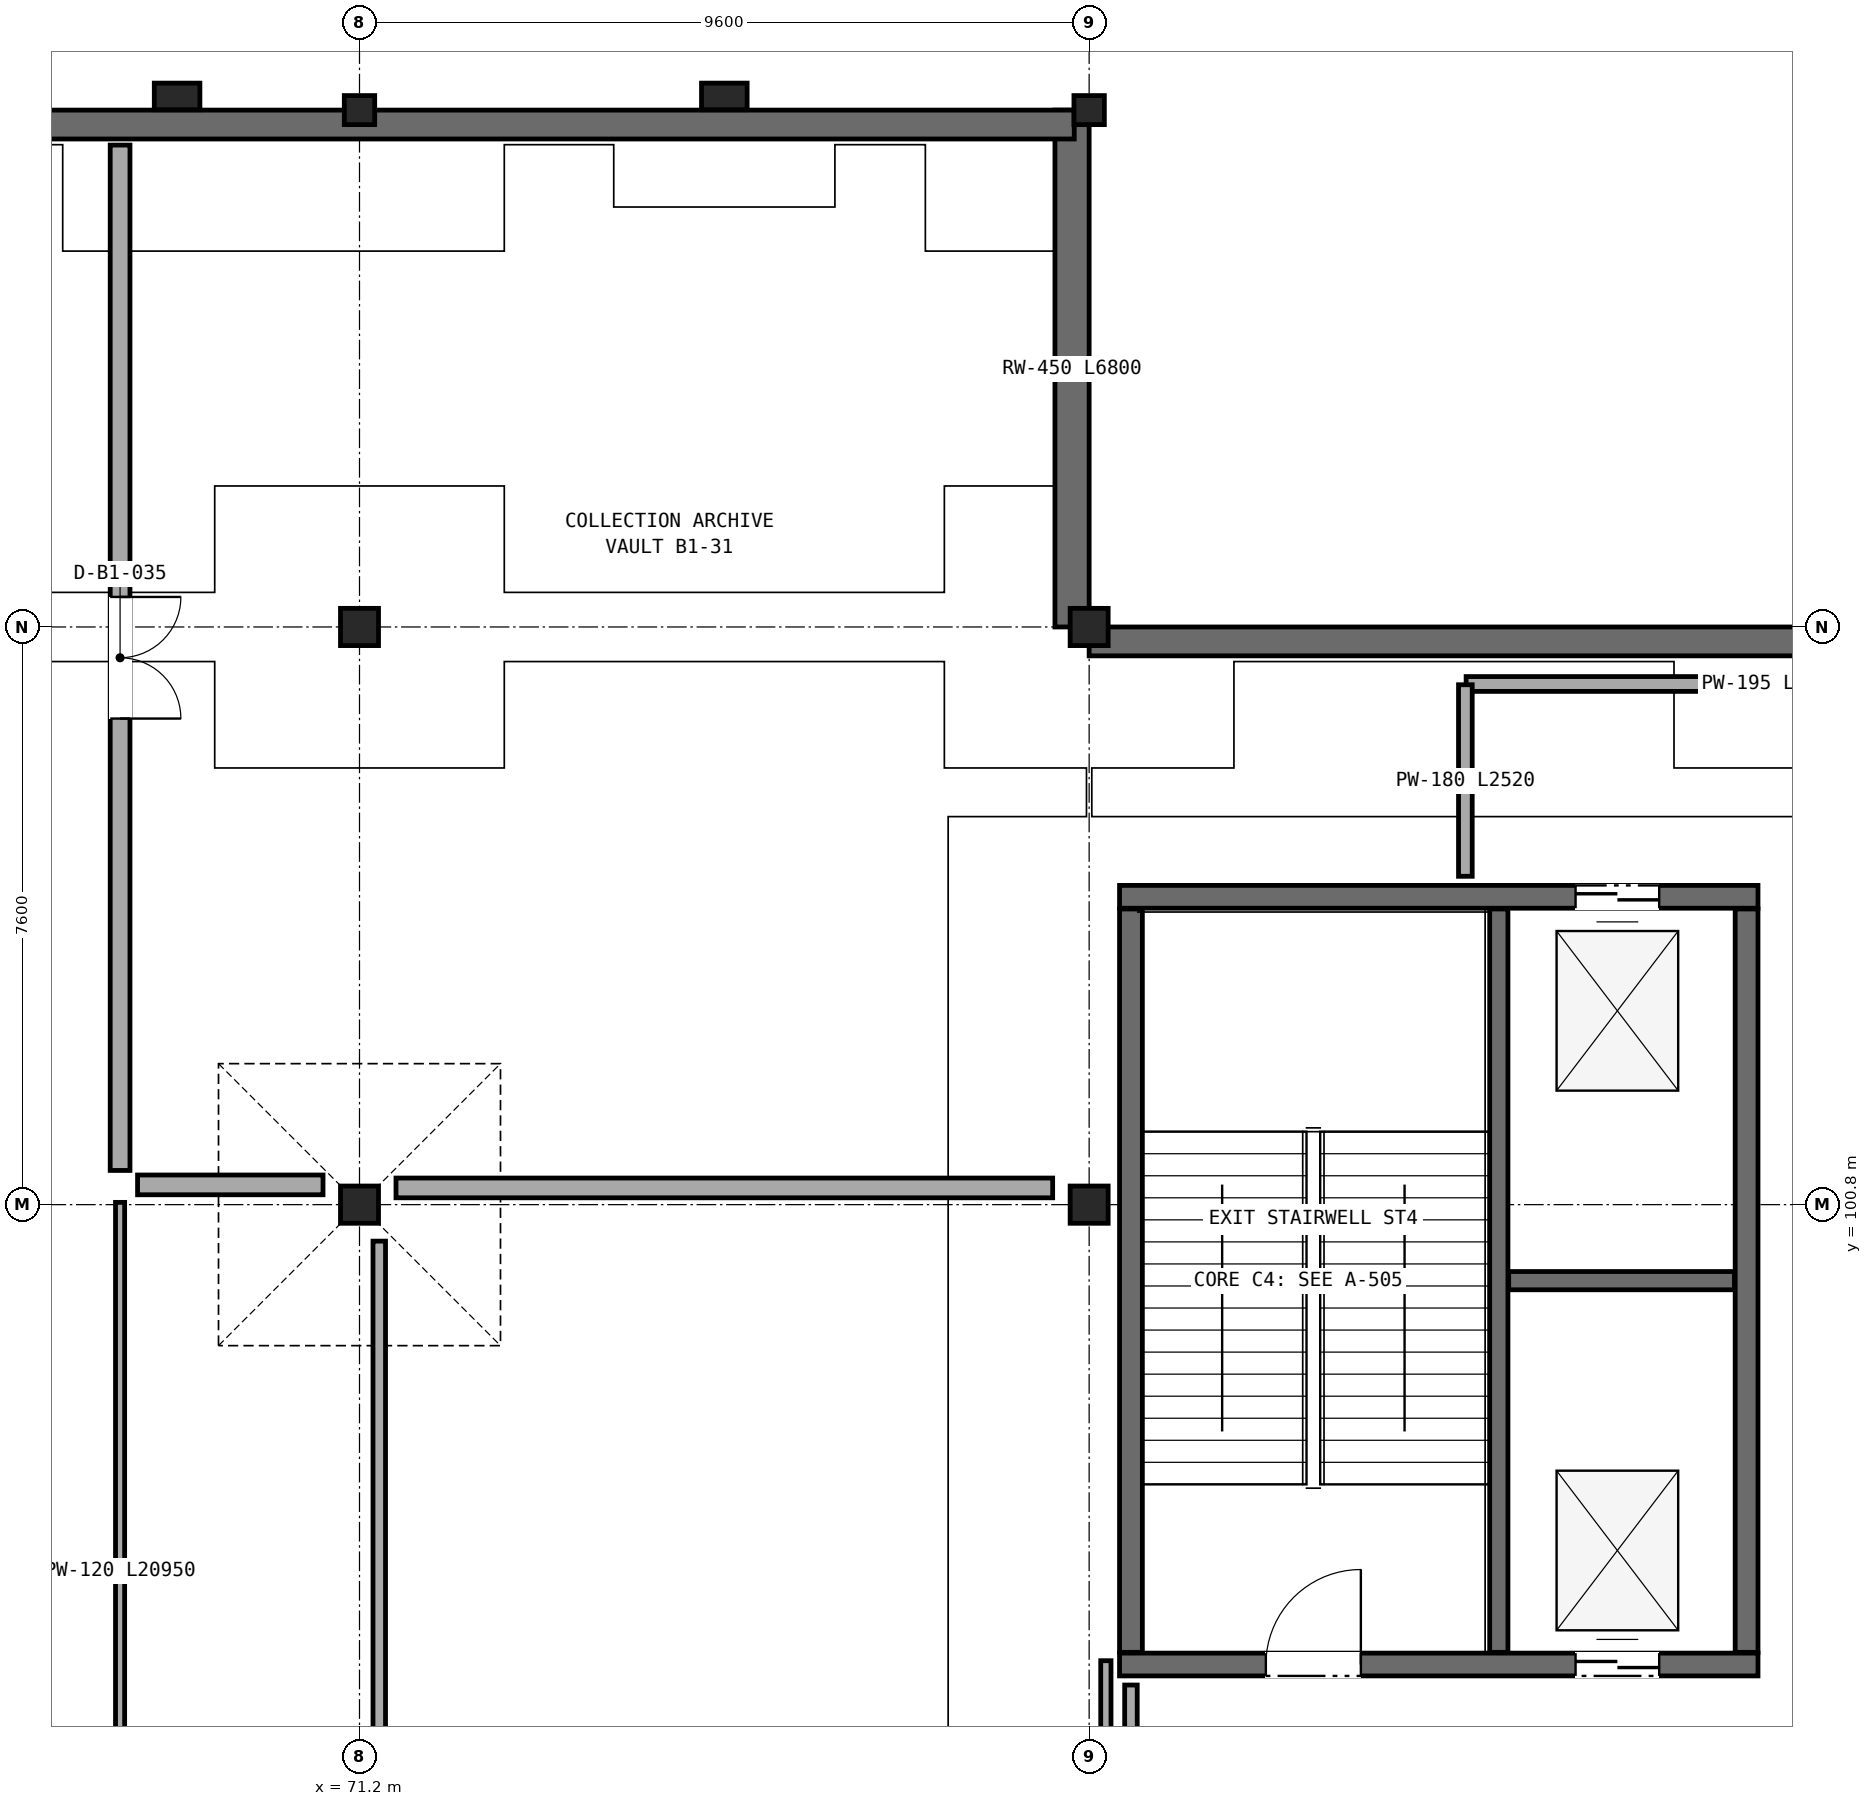
"""IFC4 building model, lengths in metres.
Left out: names, types, materials, properties, quantities, classifications, styles, units other than length and angle.
Written with IfcOpenShell. Run it as: python <this file> out.ifc"""

import sys

from ifc_helpers import new_model, si_unit, direction, frame, frame_2d, origin, origin_2d, place, context, subcontext, project, spatial, rectangle, i_section, extrude, element, fill, save


model = new_model("IFC4")
c1 = context("Model", 3, precision=1e-05, world=origin(), true_north=direction((0.0, 1.0)))
c2 = subcontext(c1, "Body", "Model", "MODEL_VIEW")
j1 = project(units=[si_unit("LENGTHUNIT", "METRE"), si_unit("PLANEANGLEUNIT", "RADIAN")], contexts=[c1])
p1 = place(None, origin())
s1 = spatial("IfcSite", under=j1, at=p1, CompositionType="ELEMENT")
p2 = place(p1, origin())
s2 = spatial("IfcBuilding", under=s1, at=p2, CompositionType="ELEMENT")
p3 = place(p2, frame((0.0, 0.0, -5.4)))
s3 = spatial("IfcBuildingStorey", under=s2, at=p3, CompositionType="ELEMENT", Elevation=-5.4)
for number, where, z_axis, x_axis in (
    (1, (71.2, 100.8, 0.0), (0.0, 0.0, 1.0), (1.0, 0.0, 0.0)),
    (2, (71.2, 108.4, 0.0), (0.0, 0.0, 1.0), (1.0, 0.0, 0.0)),
):
    element("IfcColumn", number, at=place(p3, frame(where, z_axis=z_axis, x_axis=x_axis)), inside=s3, PredefinedType="COLUMN", context=c2, shape_type="SweptSolid", body=[
        extrude(i_section(OverallWidth=0.5, OverallDepth=0.49, WebThickness=0.028, FlangeThickness=0.04, at=origin_2d()), origin(), (0.0, 0.0, 1.0), 5.4),
    ])
p4 = place(p3, frame((71.2, 115.2, 0.0), z_axis=(0.0, 0.0, 1.0), x_axis=(1.0, 0.0, 0.0)))
e3 = element("IfcColumn", 3, at=p4, inside=s3, PredefinedType="COLUMN", context=c2, shape_type="SweptSolid", body=[
    extrude(i_section(OverallWidth=0.4, OverallDepth=0.382, WebThickness=0.025, FlangeThickness=0.036, at=origin_2d()), origin(), (0.0, 0.0, 1.0), 5.4),
])
for number, where, z_axis, x_axis in (
    (4, (80.8, 100.8, 0.0), (0.0, 0.0, 1.0), (1.0, 0.0, 0.0)),
    (5, (80.8, 108.4, 0.0), (0.0, 0.0, 1.0), (1.0, 0.0, 0.0)),
):
    element("IfcColumn", number, at=place(p3, frame(where, z_axis=z_axis, x_axis=x_axis)), inside=s3, PredefinedType="COLUMN", context=c2, shape_type="SweptSolid", body=[
        extrude(i_section(OverallWidth=0.5, OverallDepth=0.49, WebThickness=0.028, FlangeThickness=0.04, at=origin_2d()), origin(), (0.0, 0.0, 1.0), 5.4),
    ])
p5 = place(p3, frame((80.8, 115.2, 0.0), z_axis=(0.0, 0.0, 1.0), x_axis=(1.0, 0.0, 0.0)))
e6 = element("IfcColumn", 6, at=p5, inside=s3, PredefinedType="COLUMN", context=c2, shape_type="SweptSolid", body=[
    extrude(i_section(OverallWidth=0.4, OverallDepth=0.382, WebThickness=0.025, FlangeThickness=0.036, at=origin_2d()), origin(), (0.0, 0.0, 1.0), 5.4),
])
for number, where, z_axis, x_axis in (
    (7, (68.8, 115.38, 0.0), (0.0, 0.0, 1.0), (1.0, 0.0, 0.0)),
    (8, (76.0, 115.38, 0.0), (0.0, 0.0, 1.0), (1.0, 0.0, 0.0)),
):
    element("IfcColumn", number, at=place(p3, frame(where, z_axis=z_axis, x_axis=x_axis)), inside=s3, PredefinedType="PILASTER", context=c2, shape_type="SweptSolid", body=[
        extrude(rectangle(XDim=0.6, YDim=0.35, at=origin_2d()), origin(), (0.0, 0.0, 1.0), 5.4),
    ])
p6 = place(p3, frame((119.004, 108.21, 0.0), z_axis=(0.0, 0.0, 1.0), x_axis=(-1.0, 0.0, 0.0)))
e9 = element("IfcWall", 9, at=p6, inside=s3, PredefinedType="USERDEFINED", context=c2, shape_type="SweptSolid", body=[
    extrude(rectangle(XDim=38.204, YDim=0.38, at=frame_2d((19.102, 0.0))), origin(), (0.0, 0.0, 1.0), 5.06),
])
p7 = place(p3, frame((80.575, 108.4, 0.0), z_axis=(0.0, 0.0, 1.0), x_axis=(0.0, 1.0, 0.0)))
e10 = element("IfcWall", 10, at=p7, inside=s3, PredefinedType="USERDEFINED", context=c2, shape_type="SweptSolid", body=[
    extrude(rectangle(XDim=6.8, YDim=0.45, at=frame_2d((3.4, 0.0))), origin(), (0.0, 0.0, 1.0), 5.06),
])
p8 = place(p3, frame((80.604, 115.01, 0.0), z_axis=(0.0, 0.0, 1.0), x_axis=(-1.0, 0.0, 0.0)))
e11 = element("IfcWall", 11, at=p8, inside=s3, PredefinedType="USERDEFINED", context=c2, shape_type="SweptSolid", body=[
    extrude(rectangle(XDim=38.204, YDim=0.38, at=frame_2d((19.102, 0.0))), origin(), (0.0, 0.0, 1.0), 5.06),
])
p9 = place(p3, frame((81.2, 94.75, 0.0), z_axis=(0.0, 0.0, 1.0), x_axis=(1.0, 0.0, 0.0)))
e12 = element("IfcWall", 12, at=p9, inside=s3, PredefinedType="SHEAR", context=c2, shape_type="SweptSolid", body=[
    extrude(rectangle(XDim=8.4, YDim=0.3, at=frame_2d((4.2, 0.0))), origin(), (0.0, 0.0, 1.0), 5.095),
])
p10 = place(p9, frame((1.925, 0.0, 0.0)))
e13 = element("IfcOpeningElement", 13, at=p10, cuts=e12, PredefinedType="OPENING", context=c2, shape_type="SweptSolid", body=[
    extrude(rectangle(XDim=1.25, YDim=2.2, at=frame_2d((0.625, 1.1))), frame((0.0, 0.16, 0.0), z_axis=(0.0, -1.0, 0.0), x_axis=(1.0, 0.0, 0.0)), (0.0, 0.0, 1.0), 0.32),
])
p11 = place(p9, frame((6.0, 0.0, 0.0)))
e14 = element("IfcOpeningElement", 14, at=p11, cuts=e12, PredefinedType="OPENING", context=c2, shape_type="SweptSolid", body=[
    extrude(rectangle(XDim=1.1, YDim=2.2, at=frame_2d((0.55, 1.1))), frame((0.0, 0.16, 0.0), z_axis=(0.0, -1.0, 0.0), x_axis=(1.0, 0.0, 0.0)), (0.0, 0.0, 1.0), 0.32),
])
p12 = place(p3, frame((89.6, 104.85, 0.0), z_axis=(0.0, 0.0, 1.0), x_axis=(-1.0, 0.0, 0.0)))
e15 = element("IfcWall", 15, at=p12, inside=s3, PredefinedType="SHEAR", context=c2, shape_type="SweptSolid", body=[
    extrude(rectangle(XDim=8.4, YDim=0.3, at=frame_2d((4.2, 0.0))), origin(), (0.0, 0.0, 1.0), 5.095),
])
p13 = place(p12, frame((1.3, 0.0, 0.0)))
e16 = element("IfcOpeningElement", 16, at=p13, cuts=e15, PredefinedType="OPENING", context=c2, shape_type="SweptSolid", body=[
    extrude(rectangle(XDim=1.1, YDim=2.2, at=frame_2d((0.55, 1.1))), frame((0.0, 0.16, 0.0), z_axis=(0.0, -1.0, 0.0), x_axis=(1.0, 0.0, 0.0)), (0.0, 0.0, 1.0), 0.32),
])
for number, where, z_axis, x_axis in (
    (17, (89.45, 94.91, 0.0), (0.0, 0.0, 1.0), (0.0, 1.0, 0.0)),
    (18, (81.35, 104.69, 0.0), (0.0, 0.0, 1.0), (0.0, -1.0, 0.0)),
):
    element("IfcWall", number, at=place(p3, frame(where, z_axis=z_axis, x_axis=x_axis)), inside=s3, PredefinedType="SHEAR", context=c2, shape_type="SweptSolid", body=[
        extrude(rectangle(XDim=9.78, YDim=0.3, at=frame_2d((4.89, 0.0))), origin(), (0.0, 0.0, 1.0), 5.095),
    ])
p14 = place(p3, frame((86.19, 94.91, 0.0), z_axis=(0.0, 0.0, 1.0), x_axis=(0.0, 1.0, 0.0)))
e19 = element("IfcWall", 19, at=p14, inside=s3, PredefinedType="SOLIDWALL", context=c2, shape_type="SweptSolid", body=[
    extrude(rectangle(XDim=9.78, YDim=0.24, at=frame_2d((4.89, 0.0))), origin(), (0.0, 0.0, 1.0), 5.095),
])
p15 = place(p3, frame((86.32, 99.8, 0.0), z_axis=(0.0, 0.0, 1.0), x_axis=(1.0, 0.0, 0.0)))
e20 = element("IfcWall", 20, at=p15, inside=s3, PredefinedType="SOLIDWALL", context=c2, shape_type="SweptSolid", body=[
    extrude(rectangle(XDim=2.97, YDim=0.24, at=frame_2d((1.485, 0.0))), origin(), (0.0, 0.0, 1.0), 5.095),
])
p16 = place(p3, frame((93.79, 107.65, 0.0), z_axis=(0.0, 0.0, 1.0), x_axis=(-1.0, 0.0, 0.0)))
e21 = element("IfcWall", 21, at=p16, inside=s3, PredefinedType="PARTITIONING", context=c2, shape_type="SweptSolid", body=[
    extrude(rectangle(XDim=8.03, YDim=0.195, at=frame_2d((4.015, 0.0))), origin(), (0.0, 0.0, 1.0), 4.537),
])
p17 = place(p3, frame((85.75, 107.64, 0.0), z_axis=(0.0, 0.0, 1.0), x_axis=(0.0, -1.0, 0.0)))
e22 = element("IfcWall", 22, at=p17, inside=s3, PredefinedType="PARTITIONING", context=c2, shape_type="SweptSolid", body=[
    extrude(rectangle(XDim=2.52, YDim=0.18, at=frame_2d((1.26, 0.0))), origin(), (0.0, 0.0, 1.0), 5.03),
])
p18 = place(p3, frame((81.35, 94.48, 0.0), z_axis=(0.0, 0.0, 1.0), x_axis=(0.0, -1.0, 0.0)))
e23 = element("IfcWall", 23, at=p18, inside=s3, PredefinedType="PARTITIONING", context=c2, shape_type="SweptSolid", body=[
    extrude(rectangle(XDim=1.97, YDim=0.165, at=frame_2d((0.985, 0.0))), origin(), (0.0, 0.0, 1.0), 5.03),
])
p19 = place(p3, frame((81.02, 92.48, 0.0), z_axis=(0.0, 0.0, 1.0), x_axis=(0.0, 1.0, 0.0)))
e24 = element("IfcWall", 24, at=p19, inside=s3, PredefinedType="PARTITIONING", context=c2, shape_type="SweptSolid", body=[
    extrude(rectangle(XDim=2.32, YDim=0.135, at=frame_2d((1.16, 0.0))), origin(), (0.0, 0.0, 1.0), 4.527),
])
p20 = place(p3, frame((68.05, 79.88, 0.0), z_axis=(0.0, 0.0, 1.0), x_axis=(0.0, 1.0, 0.0)))
e25 = element("IfcWall", 25, at=p20, inside=s3, PredefinedType="PARTITIONING", context=c2, shape_type="SweptSolid", body=[
    extrude(rectangle(XDim=20.95, YDim=0.12, at=frame_2d((10.475, 0.0))), origin(), (0.0, 0.0, 1.0), 4.448),
])
p21 = place(p20, frame((9.7, 0.0, 0.0)))
e26 = element("IfcOpeningElement", 26, at=p21, cuts=e25, PredefinedType="OPENING", context=c2, shape_type="SweptSolid", body=[
    extrude(rectangle(XDim=1.55, YDim=2.58, at=frame_2d((0.775, 1.29))), frame((0.0, 0.07, 0.0), z_axis=(0.0, -1.0, 0.0), x_axis=(1.0, 0.0, 0.0)), (0.0, 0.0, 1.0), 0.14),
])
p22 = place(p3, frame((68.05, 101.25, 0.0), z_axis=(0.0, 0.0, 1.0), x_axis=(0.0, 1.0, 0.0)))
e27 = element("IfcWall", 27, at=p22, inside=s3, PredefinedType="SOLIDWALL", context=c2, shape_type="SweptSolid", body=[
    extrude(rectangle(XDim=13.49, YDim=0.26, at=frame_2d((6.745, 0.0))), origin(), (0.0, 0.0, 1.0), 4.448),
])
p23 = place(p22, frame((5.945, 0.0, 0.0)))
e28 = element("IfcOpeningElement", 28, at=p23, cuts=e27, PredefinedType="OPENING", context=c2, shape_type="SweptSolid", body=[
    extrude(rectangle(XDim=1.6, YDim=2.4, at=frame_2d((0.8, 1.2))), frame((0.0, 0.14, 0.0), z_axis=(0.0, -1.0, 0.0), x_axis=(1.0, 0.0, 0.0)), (0.0, 0.0, 1.0), 0.28),
])
p24 = place(p3, frame((68.28, 101.06, 0.0), z_axis=(0.0, 0.0, 1.0), x_axis=(1.0, 0.0, 0.0)))
e29 = element("IfcWall", 29, at=p24, inside=s3, PredefinedType="SOLIDWALL", context=c2, shape_type="SweptSolid", body=[
    extrude(rectangle(XDim=2.44, YDim=0.26, at=frame_2d((1.22, 0.0))), origin(), (0.0, 0.0, 1.0), 4.448),
])
p25 = place(p3, frame((71.46, 100.32, 0.0), z_axis=(0.0, 0.0, 1.0), x_axis=(0.0, -1.0, 0.0)))
e30 = element("IfcWall", 30, at=p25, inside=s3, PredefinedType="PARTITIONING", context=c2, shape_type="SweptSolid", body=[
    extrude(rectangle(XDim=20.44, YDim=0.165, at=frame_2d((10.22, 0.0))), origin(), (0.0, 0.0, 1.0), 4.448),
])
p26 = place(p3, frame((80.32, 101.02, 0.0), z_axis=(0.0, 0.0, 1.0), x_axis=(-1.0, 0.0, 0.0)))
e31 = element("IfcWall", 31, at=p26, inside=s3, PredefinedType="SOLIDWALL", context=c2, shape_type="SweptSolid", body=[
    extrude(rectangle(XDim=8.64, YDim=0.26, at=frame_2d((4.32, 0.0))), origin(), (0.0, 0.0, 1.0), 4.448),
])
p27 = place(p10, origin())
e32 = element("IfcDoor", 32, at=p27, inside=s3, OperationType="SINGLE_SWING_RIGHT", PredefinedType="DOOR", context=c2, shape_type="SweptSolid", body=[
    extrude(rectangle(XDim=1.25, YDim=2.2, at=frame_2d((0.625, 1.1))), frame((0.0, 0.025, 0.0), z_axis=(0.0, -1.0, 0.0), x_axis=(1.0, 0.0, 0.0)), (0.0, 0.0, 1.0), 0.05),
])
fill(e13, e32)
p28 = place(p11, origin())
e33 = element("IfcDoor", 33, at=p28, inside=s3, OperationType="DOUBLE_DOOR_SLIDING", PredefinedType="DOOR", context=c2, shape_type="SweptSolid", body=[
    extrude(rectangle(XDim=1.1, YDim=2.2, at=frame_2d((0.55, 1.1))), frame((0.0, 0.025, 0.0), z_axis=(0.0, -1.0, 0.0), x_axis=(1.0, 0.0, 0.0)), (0.0, 0.0, 1.0), 0.05),
])
fill(e14, e33)
p29 = place(p13, origin())
e34 = element("IfcDoor", 34, at=p29, inside=s3, OperationType="DOUBLE_DOOR_SLIDING", PredefinedType="DOOR", context=c2, shape_type="SweptSolid", body=[
    extrude(rectangle(XDim=1.1, YDim=2.2, at=frame_2d((0.55, 1.1))), frame((0.0, 0.025, 0.0), z_axis=(0.0, -1.0, 0.0), x_axis=(1.0, 0.0, 0.0)), (0.0, 0.0, 1.0), 0.05),
])
fill(e16, e34)
p30 = place(p23, frame((1.6, 0.0, 0.0), z_axis=(0.0, 0.0, 1.0), x_axis=(-1.0, 0.0, 0.0)))
e35 = element("IfcDoor", 35, at=p30, inside=s3, OperationType="DOUBLE_DOOR_SINGLE_SWING", PredefinedType="DOOR", context=c2, shape_type="SweptSolid", body=[
    extrude(rectangle(XDim=1.6, YDim=2.4, at=frame_2d((0.8, 1.2))), frame((0.0, 0.025, 0.0), z_axis=(0.0, -1.0, 0.0), x_axis=(1.0, 0.0, 0.0)), (0.0, 0.0, 1.0), 0.05),
])
fill(e28, e35)
save(model, sys.argv[1])
